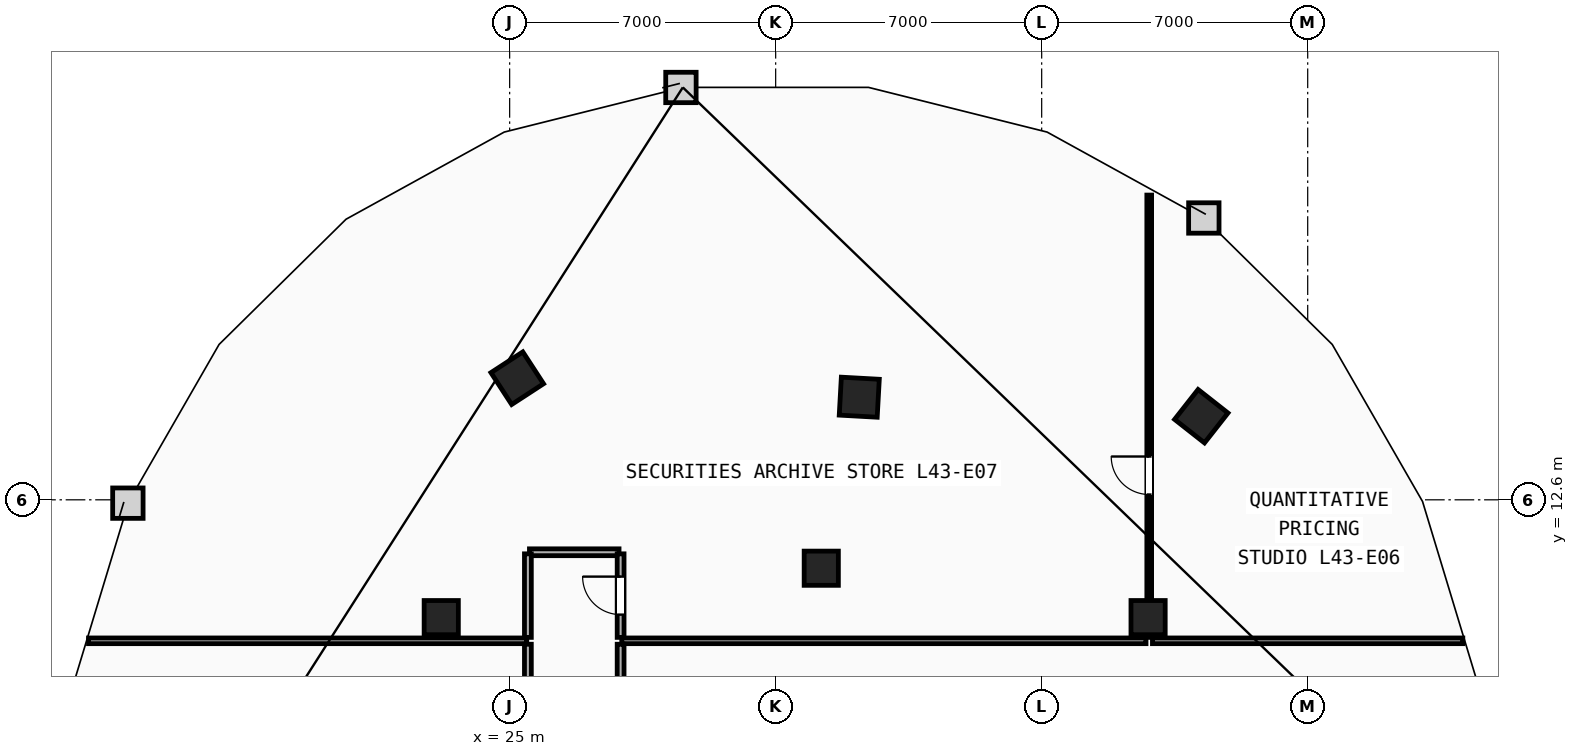
"""IFC4 building model, lengths in metres.
Left out: names, types, materials, properties, quantities, classifications, styles, units other than length and angle.
Written with IfcOpenShell. Run it as: python <this file> out.ifc"""

import sys

from ifc_helpers import new_model, si_unit, direction, frame, frame_2d, origin, origin_2d, place, context, subcontext, project, spatial, rectangle, extrude, element, fill, save


model = new_model("IFC4")
c1 = context("Model", 3, precision=1e-05, world=origin(), true_north=direction((0.0, 1.0)))
c2 = subcontext(c1, "Body", "Model", "MODEL_VIEW")
j1 = project(units=[si_unit("LENGTHUNIT", "METRE"), si_unit("PLANEANGLEUNIT", "RADIAN")], contexts=[c1])
p1 = place(None, origin())
s1 = spatial("IfcSite", under=j1, at=p1, CompositionType="ELEMENT")
p2 = place(p1, origin())
s2 = spatial("IfcBuilding", under=s1, at=p2, CompositionType="ELEMENT")
p3 = place(p2, frame((0.0, 0.0, 165.6)))
s3 = spatial("IfcBuildingStorey", under=s2, at=p3, CompositionType="ELEMENT", Elevation=165.6)
for number, where, z_axis, x_axis in (
    (1, (41.8, 9.5, 0.0), (0.0, 0.0, 1.0), (1.0, 0.0, 0.0)),
    (2, (33.2, 10.8, 0.0), (0.0, 0.0, 1.0), (1.0, 0.0, 0.0)),
    (3, (23.2, 9.5, 0.0), (0.0, 0.0, 1.0), (1.0, 0.0, 0.0)),
):
    element("IfcColumn", number, at=place(p3, frame(where, z_axis=z_axis, x_axis=x_axis)), inside=s3, PredefinedType="COLUMN", context=c2, shape_type="SweptSolid", body=[
        extrude(rectangle(XDim=0.9, YDim=0.9, at=origin_2d()), origin(), (0.0, 0.0, 1.0), 3.6),
    ])
for number, where, z_axis, x_axis in (
    (4, (43.2, 14.8, 0.0), (0.0, 0.0, 1.0), (-0.786, 0.618, 0.0)),
    (5, (34.2, 15.3, 0.0), (0.0, 0.0, 1.0), (-0.998, 0.055, 0.0)),
    (6, (25.2, 15.8, 0.0), (0.0, 0.0, 1.0), (-0.838, -0.546, 0.0)),
):
    element("IfcColumn", number, at=place(p3, frame(where, z_axis=z_axis, x_axis=x_axis)), inside=s3, PredefinedType="COLUMN", context=c2, shape_type="SweptSolid", body=[
        extrude(rectangle(XDim=1.0, YDim=1.0, at=origin_2d()), origin(), (0.0, 0.0, 1.0), 3.6),
    ])
p4 = place(p3, frame((13.918, 8.89, 0.0), z_axis=(0.0, 0.0, 1.0), x_axis=(1.0, 0.0, 0.0)))
e7 = element("IfcWall", 7, at=p4, inside=s3, PredefinedType="PARTITIONING", context=c2, shape_type="SweptSolid", body=[
    extrude(rectangle(XDim=11.532, YDim=0.15, at=frame_2d((5.766, 0.0))), origin(), (0.0, 0.0, 1.0), 3.36),
])
p5 = place(p3, frame((27.95, 8.89, 0.0), z_axis=(0.0, 0.0, 1.0), x_axis=(1.0, 0.0, 0.0)))
e8 = element("IfcWall", 8, at=p5, inside=s3, PredefinedType="PARTITIONING", context=c2, shape_type="SweptSolid", body=[
    extrude(rectangle(XDim=13.795, YDim=0.15, at=frame_2d((6.897, 0.0))), origin(), (0.0, 0.0, 1.0), 3.36),
])
p6 = place(p3, frame((41.915, 8.89, 0.0), z_axis=(0.0, 0.0, 1.0), x_axis=(1.0, 0.0, 0.0)))
e9 = element("IfcWall", 9, at=p6, inside=s3, PredefinedType="PARTITIONING", context=c2, shape_type="SweptSolid", body=[
    extrude(rectangle(XDim=8.167, YDim=0.15, at=frame_2d((4.083, 0.0))), origin(), (0.0, 0.0, 1.0), 3.36),
])
p7 = place(p3, frame((25.48, 8.8, 0.0), z_axis=(0.0, 0.0, 1.0), x_axis=(0.0, -1.0, 0.0)))
e10 = element("IfcWall", 10, at=p7, inside=s3, PredefinedType="PARTITIONING", context=c2, shape_type="SweptSolid", body=[
    extrude(rectangle(XDim=8.35, YDim=0.18, at=frame_2d((4.175, 0.0))), origin(), (0.0, 0.0, 1.0), 3.36),
])
p8 = place(p3, frame((27.92, 0.45, 0.0), z_axis=(0.0, 0.0, 1.0), x_axis=(0.0, 1.0, 0.0)))
e11 = element("IfcWall", 11, at=p8, inside=s3, PredefinedType="PARTITIONING", context=c2, shape_type="SweptSolid", body=[
    extrude(rectangle(XDim=8.35, YDim=0.18, at=frame_2d((4.175, 0.0))), origin(), (0.0, 0.0, 1.0), 3.36),
])
p9 = place(p8, frame((3.675, 0.0, 0.0)))
e12 = element("IfcOpeningElement", 12, at=p9, cuts=e11, PredefinedType="OPENING", context=c2, shape_type="SweptSolid", body=[
    extrude(rectangle(XDim=1.0, YDim=2.15, at=frame_2d((0.5, 1.075))), frame((0.0, 0.1, 0.0), z_axis=(0.0, -1.0, 0.0), x_axis=(1.0, 0.0, 0.0)), (0.0, 0.0, 1.0), 0.2),
])
p10 = place(p3, frame((27.878, 11.22, 0.0), z_axis=(0.0, 0.0, 1.0), x_axis=(-1.0, 0.0, 0.0)))
e13 = element("IfcWall", 13, at=p10, inside=s3, PredefinedType="PARTITIONING", context=c2, shape_type="SweptSolid", body=[
    extrude(rectangle(XDim=2.357, YDim=0.18, at=frame_2d((1.178, 0.0))), origin(), (0.0, 0.0, 1.0), 3.36),
])
p11 = place(p3, frame((25.48, 11.178, 0.0), z_axis=(0.0, 0.0, 1.0), x_axis=(0.0, -1.0, 0.0)))
e14 = element("IfcWall", 14, at=p11, inside=s3, PredefinedType="PARTITIONING", context=c2, shape_type="SweptSolid", body=[
    extrude(rectangle(XDim=2.198, YDim=0.18, at=frame_2d((1.099, 0.0))), origin(), (0.0, 0.0, 1.0), 3.36),
])
p12 = place(p3, frame((27.92, 8.98, 0.0), z_axis=(0.0, 0.0, 1.0), x_axis=(0.0, 1.0, 0.0)))
e15 = element("IfcWall", 15, at=p12, inside=s3, PredefinedType="PARTITIONING", context=c2, shape_type="SweptSolid", body=[
    extrude(rectangle(XDim=2.198, YDim=0.18, at=frame_2d((1.099, 0.0))), origin(), (0.0, 0.0, 1.0), 3.36),
])
p13 = place(p12, frame((0.599, 0.0, 0.0)))
e16 = element("IfcOpeningElement", 16, at=p13, cuts=e15, PredefinedType="OPENING", context=c2, shape_type="SweptSolid", body=[
    extrude(rectangle(XDim=1.0, YDim=2.15, at=frame_2d((0.5, 1.075))), frame((0.0, 0.1, 0.0), z_axis=(0.0, -1.0, 0.0), x_axis=(1.0, 0.0, 0.0)), (0.0, 0.0, 1.0), 0.2),
])
p14 = place(p3, frame((41.83, 8.98, 0.0), z_axis=(0.0, 0.0, 1.0), x_axis=(0.0, 1.0, 0.0)))
e17 = element("IfcWall", 17, at=p14, inside=s3, PredefinedType="PARTITIONING", context=c2, shape_type="SweptSolid", body=[
    extrude(rectangle(XDim=11.638, YDim=0.125, at=frame_2d((5.819, 0.0))), origin(), (0.0, 0.0, 1.0), 2.897),
])
p15 = place(p14, frame((3.76, 0.0, 0.0)))
e18 = element("IfcOpeningElement", 18, at=p15, cuts=e17, PredefinedType="OPENING", context=c2, shape_type="SweptSolid", body=[
    extrude(rectangle(XDim=1.0, YDim=2.15, at=frame_2d((0.5, 1.075))), frame((0.0, 0.073, 0.0), z_axis=(0.0, -1.0, 0.0), x_axis=(1.0, 0.0, 0.0)), (0.0, 0.0, 1.0), 0.145),
])
p16 = place(p15, origin())
e19 = element("IfcDoor", 19, at=p16, inside=s3, OperationType="SINGLE_SWING_RIGHT", PredefinedType="DOOR", context=c2, shape_type="SweptSolid", body=[
    extrude(rectangle(XDim=1.0, YDim=2.15, at=frame_2d((0.5, 1.075))), frame((0.0, 0.025, 0.0), z_axis=(0.0, -1.0, 0.0), x_axis=(1.0, 0.0, 0.0)), (0.0, 0.0, 1.0), 0.05),
])
fill(e18, e19)
p17 = place(p13, origin())
e20 = element("IfcDoor", 20, at=p17, inside=s3, OperationType="SINGLE_SWING_RIGHT", PredefinedType="DOOR", context=c2, shape_type="SweptSolid", body=[
    extrude(rectangle(XDim=1.0, YDim=2.15, at=frame_2d((0.5, 1.075))), frame((0.0, 0.025, 0.0), z_axis=(0.0, -1.0, 0.0), x_axis=(1.0, 0.0, 0.0)), (0.0, 0.0, 1.0), 0.05),
])
fill(e16, e20)
save(model, sys.argv[1])
